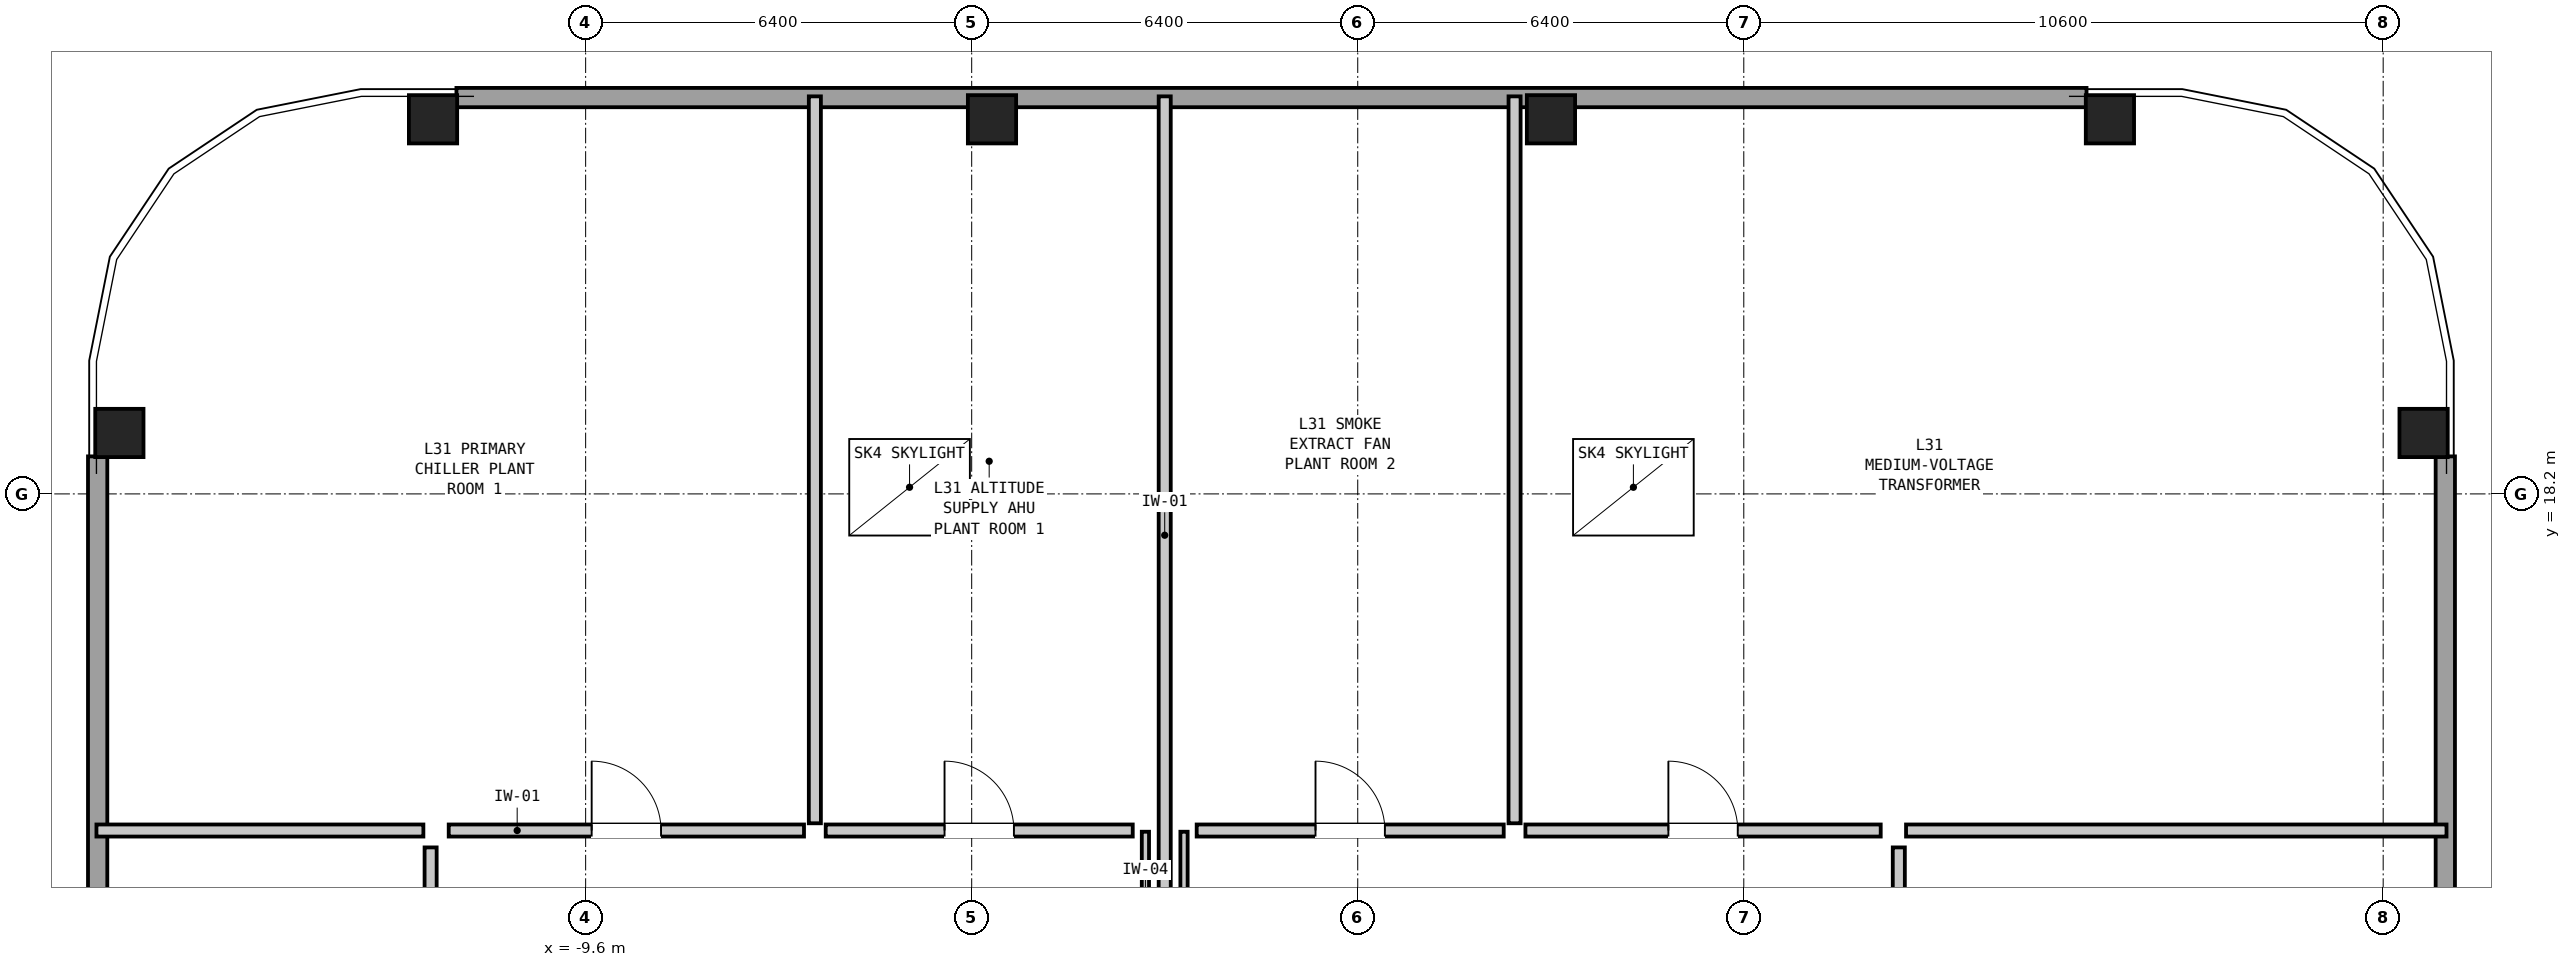
"""IFC4 building model, lengths in metres.
Left out: names, types, materials, properties, quantities, classifications, styles, units other than length and angle.
Written with IfcOpenShell. Run it as: python <this file> out.ifc"""

import sys

from ifc_helpers import new_model, si_unit, direction, frame, frame_2d, origin, origin_2d, place, context, subcontext, project, spatial, rectangle, hollow_rectangle, extrude, element, fill, save


model = new_model("IFC4")
c1 = context("Model", 3, precision=1e-05, world=origin(), true_north=direction((0.0, 1.0)))
c2 = subcontext(c1, "Body", "Model", "MODEL_VIEW")
j1 = project(units=[si_unit("LENGTHUNIT", "METRE"), si_unit("PLANEANGLEUNIT", "RADIAN")], contexts=[c1])
p1 = place(None, origin())
s1 = spatial("IfcSite", under=j1, at=p1, CompositionType="ELEMENT")
p2 = place(p1, origin())
s2 = spatial("IfcBuilding", under=s1, at=p2, CompositionType="ELEMENT")
p3 = place(p2, frame((0.0, 0.0, 108.45)))
s3 = spatial("IfcBuildingStorey", under=s2, at=p3, CompositionType="ELEMENT", Elevation=108.45)
for number, where, z_axis, x_axis in (
    (1, (20.87, 19.21, 0.0), (0.0, 0.0, 1.0), (0.0, 1.0, 0.0)),
    (2, (15.67, 24.41, 0.0), (0.0, 0.0, 1.0), (1.0, 0.0, 0.0)),
    (3, (6.403, 24.41, 0.0), (0.0, 0.0, 1.0), (1.0, 0.0, 0.0)),
    (4, (-2.863, 24.41, 0.0), (0.0, 0.0, 1.0), (1.0, 0.0, 0.0)),
    (5, (-12.13, 24.41, 0.0), (0.0, 0.0, 1.0), (1.0, 0.0, 0.0)),
    (6, (-17.33, 19.21, 0.0), (0.0, 0.0, 1.0), (0.0, 1.0, 0.0)),
):
    element("IfcColumn", number, at=place(p3, frame(where, z_axis=z_axis, x_axis=x_axis)), inside=s3, PredefinedType="COLUMN", context=c2, shape_type="SweptSolid", body=[
        extrude(hollow_rectangle(XDim=0.8, YDim=0.8, WallThickness=0.05, at=origin_2d()), origin(), (0.0, 0.0, 1.0), 4.35),
    ])
for number, where, z_axis, x_axis in (
    (7, (21.23, 18.822, 0.0), (0.0, 0.0, 1.0), (0.0, -1.0, 0.0)),
    (8, (-11.742, 24.77, 0.0), (0.0, 0.0, 1.0), (1.0, 0.0, 0.0)),
    (9, (-17.69, -8.202, 0.0), (0.0, 0.0, 1.0), (0.0, 1.0, 0.0)),
):
    element("IfcWall", number, at=place(p3, frame(where, z_axis=z_axis, x_axis=x_axis)), inside=s3, PredefinedType="SOLIDWALL", context=c2, shape_type="SweptSolid", body=[
        extrude(rectangle(XDim=27.024, YDim=0.32, at=frame_2d((13.512, 0.0))), origin(), (0.0, 0.0, 1.0), 2.31),
    ])
p4 = place(p3, frame((0.0, 10.24, 0.0), z_axis=(0.0, 0.0, 1.0), x_axis=(0.0, 1.0, 0.0)))
e10 = element("IfcWall", 10, at=p4, inside=s3, PredefinedType="PARTITIONING", context=c2, shape_type="SweptSolid", body=[
    extrude(rectangle(XDim=14.55, YDim=0.2, at=frame_2d((7.275, 0.0))), origin(), (0.0, 0.0, 1.0), 2.31),
])
for number, where, z_axis, x_axis in (
    (11, (-0.32, 10.24, 0.0), (0.0, 0.0, 1.0), (0.0, 1.0, 0.0)),
    (12, (0.32, 10.24, 0.0), (0.0, 0.0, 1.0), (0.0, 1.0, 0.0)),
):
    element("IfcWall", number, at=place(p3, frame(where, z_axis=z_axis, x_axis=x_axis)), inside=s3, PredefinedType="PARTITIONING", context=c2, shape_type="SweptSolid", body=[
        extrude(rectangle(XDim=2.36, YDim=0.12, at=frame_2d((1.18, 0.0))), origin(), (0.0, 0.0, 1.0), 2.31),
    ])
p5 = place(p3, frame((-11.87, 12.62, 0.0), z_axis=(0.0, 0.0, 1.0), x_axis=(1.0, 0.0, 0.0)))
e13 = element("IfcWall", 13, at=p5, inside=s3, PredefinedType="PARTITIONING", context=c2, shape_type="SweptSolid", body=[
    extrude(rectangle(XDim=5.89, YDim=0.2, at=frame_2d((2.945, 0.0))), origin(), (0.0, 0.0, 1.0), 4.13),
])
p6 = place(p5, frame((2.37, 0.0, 0.0)))
e14 = element("IfcOpeningElement", 14, at=p6, cuts=e13, PredefinedType="OPENING", context=c2, shape_type="SweptSolid", body=[
    extrude(rectangle(XDim=1.15, YDim=2.1, at=frame_2d((0.575, 1.05))), frame((0.0, 0.112, 0.0), z_axis=(0.0, -1.0, 0.0), x_axis=(1.0, 0.0, 0.0)), (0.0, 0.0, 1.0), 0.224),
])
p7 = place(p3, frame((-5.8, 12.74, 0.0), z_axis=(0.0, 0.0, 1.0), x_axis=(0.0, 1.0, 0.0)))
e15 = element("IfcWall", 15, at=p7, inside=s3, PredefinedType="PARTITIONING", context=c2, shape_type="SweptSolid", body=[
    extrude(rectangle(XDim=12.05, YDim=0.2, at=frame_2d((6.025, 0.0))), origin(), (0.0, 0.0, 1.0), 3.647),
])
p8 = place(p3, frame((-5.62, 12.62, 0.0), z_axis=(0.0, 0.0, 1.0), x_axis=(1.0, 0.0, 0.0)))
e16 = element("IfcWall", 16, at=p8, inside=s3, PredefinedType="PARTITIONING", context=c2, shape_type="SweptSolid", body=[
    extrude(rectangle(XDim=5.09, YDim=0.2, at=frame_2d((2.545, 0.0))), origin(), (0.0, 0.0, 1.0), 4.13),
])
p9 = place(p8, frame((1.97, 0.0, 0.0)))
e17 = element("IfcOpeningElement", 17, at=p9, cuts=e16, PredefinedType="OPENING", context=c2, shape_type="SweptSolid", body=[
    extrude(rectangle(XDim=1.15, YDim=2.1, at=frame_2d((0.575, 1.05))), frame((0.0, 0.112, 0.0), z_axis=(0.0, -1.0, 0.0), x_axis=(1.0, 0.0, 0.0)), (0.0, 0.0, 1.0), 0.224),
])
p10 = place(p3, frame((0.53, 12.62, 0.0), z_axis=(0.0, 0.0, 1.0), x_axis=(1.0, 0.0, 0.0)))
e18 = element("IfcWall", 18, at=p10, inside=s3, PredefinedType="PARTITIONING", context=c2, shape_type="SweptSolid", body=[
    extrude(rectangle(XDim=5.09, YDim=0.2, at=frame_2d((2.545, 0.0))), origin(), (0.0, 0.0, 1.0), 4.13),
])
p11 = place(p10, frame((1.97, 0.0, 0.0)))
e19 = element("IfcOpeningElement", 19, at=p11, cuts=e18, PredefinedType="OPENING", context=c2, shape_type="SweptSolid", body=[
    extrude(rectangle(XDim=1.15, YDim=2.1, at=frame_2d((0.575, 1.05))), frame((0.0, 0.112, 0.0), z_axis=(0.0, -1.0, 0.0), x_axis=(1.0, 0.0, 0.0)), (0.0, 0.0, 1.0), 0.224),
])
p12 = place(p3, frame((5.8, 12.74, 0.0), z_axis=(0.0, 0.0, 1.0), x_axis=(0.0, 1.0, 0.0)))
e20 = element("IfcWall", 20, at=p12, inside=s3, PredefinedType="PARTITIONING", context=c2, shape_type="SweptSolid", body=[
    extrude(rectangle(XDim=12.05, YDim=0.2, at=frame_2d((6.025, 0.0))), origin(), (0.0, 0.0, 1.0), 3.647),
])
p13 = place(p3, frame((5.98, 12.62, 0.0), z_axis=(0.0, 0.0, 1.0), x_axis=(1.0, 0.0, 0.0)))
e21 = element("IfcWall", 21, at=p13, inside=s3, PredefinedType="PARTITIONING", context=c2, shape_type="SweptSolid", body=[
    extrude(rectangle(XDim=5.89, YDim=0.2, at=frame_2d((2.945, 0.0))), origin(), (0.0, 0.0, 1.0), 4.13),
])
p14 = place(p13, frame((2.37, 0.0, 0.0)))
e22 = element("IfcOpeningElement", 22, at=p14, cuts=e21, PredefinedType="OPENING", context=c2, shape_type="SweptSolid", body=[
    extrude(rectangle(XDim=1.15, YDim=2.1, at=frame_2d((0.575, 1.05))), frame((0.0, 0.112, 0.0), z_axis=(0.0, -1.0, 0.0), x_axis=(1.0, 0.0, 0.0)), (0.0, 0.0, 1.0), 0.224),
])
p15 = place(p3, frame((-17.71, 12.62, 0.0), z_axis=(0.0, 0.0, 1.0), x_axis=(1.0, 0.0, 0.0)))
e23 = element("IfcWall", 23, at=p15, inside=s3, PredefinedType="PARTITIONING", context=c2, shape_type="SweptSolid", body=[
    extrude(rectangle(XDim=5.42, YDim=0.2, at=frame_2d((2.71, 0.0))), origin(), (0.0, 0.0, 1.0), 4.13),
])
p16 = place(p3, frame((12.29, 12.62, 0.0), z_axis=(0.0, 0.0, 1.0), x_axis=(1.0, 0.0, 0.0)))
e24 = element("IfcWall", 24, at=p16, inside=s3, PredefinedType="PARTITIONING", context=c2, shape_type="SweptSolid", body=[
    extrude(rectangle(XDim=8.96, YDim=0.2, at=frame_2d((4.48, 0.0))), origin(), (0.0, 0.0, 1.0), 4.13),
])
p17 = place(p3, frame((-12.17, 0.81, 0.0), z_axis=(0.0, 0.0, 1.0), x_axis=(0.0, 1.0, 0.0)))
e25 = element("IfcWall", 25, at=p17, inside=s3, PredefinedType="PARTITIONING", context=c2, shape_type="SweptSolid", body=[
    extrude(rectangle(XDim=11.53, YDim=0.2, at=frame_2d((5.765, 0.0))), origin(), (0.0, 0.0, 1.0), 4.13),
])
p18 = place(p17, frame((5.19, 0.0, 0.0)))
e26 = element("IfcOpeningElement", 26, at=p18, cuts=e25, PredefinedType="OPENING", context=c2, shape_type="SweptSolid", body=[
    extrude(rectangle(XDim=1.15, YDim=2.1, at=frame_2d((0.575, 1.05))), frame((0.0, 0.112, 0.0), z_axis=(0.0, -1.0, 0.0), x_axis=(1.0, 0.0, 0.0)), (0.0, 0.0, 1.0), 0.224),
])
p19 = place(p3, frame((12.17, 0.81, 0.0), z_axis=(0.0, 0.0, 1.0), x_axis=(0.0, 1.0, 0.0)))
e27 = element("IfcWall", 27, at=p19, inside=s3, PredefinedType="PARTITIONING", context=c2, shape_type="SweptSolid", body=[
    extrude(rectangle(XDim=11.53, YDim=0.2, at=frame_2d((5.765, 0.0))), origin(), (0.0, 0.0, 1.0), 2.11),
])
p20 = place(p19, frame((6.574, 0.0, 0.0)))
e28 = element("IfcOpeningElement", 28, at=p20, cuts=e27, PredefinedType="OPENING", context=c2, shape_type="SweptSolid", body=[
    extrude(rectangle(XDim=0.9, YDim=2.05, at=frame_2d((0.45, 1.025))), frame((0.0, 0.112, 0.0), z_axis=(0.0, -1.0, 0.0), x_axis=(1.0, 0.0, 0.0)), (0.0, 0.0, 1.0), 0.224),
])
p21 = place(p3, frame((0.0, 0.0, -0.38)))
p22 = place(p21, frame((-4.23, 18.31, 0.0), z_axis=(0.0, 0.0, 1.0), x_axis=(1.0, 0.0, 0.0)))
p23 = place(p22, frame((0.0, 0.0, 0.33)))
e29 = element("IfcWindow", 29, at=p23, inside=s3, PartitioningType="SINGLE_PANEL", PredefinedType="SKYLIGHT", context=c2, shape_type="SweptSolid", body=[
    extrude(rectangle(XDim=2.0, YDim=1.6, at=origin_2d()), origin(), (0.0, 0.0, 1.0), 0.05),
])
p24 = place(p21, frame((7.77, 18.31, 0.0), z_axis=(0.0, 0.0, 1.0), x_axis=(1.0, 0.0, 0.0)))
p25 = place(p24, frame((0.0, 0.0, 0.33)))
e30 = element("IfcWindow", 30, at=p25, inside=s3, PartitioningType="SINGLE_PANEL", PredefinedType="SKYLIGHT", context=c2, shape_type="SweptSolid", body=[
    extrude(rectangle(XDim=2.0, YDim=1.6, at=origin_2d()), origin(), (0.0, 0.0, 1.0), 0.05),
])
p26 = place(p6, origin())
e31 = element("IfcDoor", 31, at=p26, inside=s3, OperationType="SINGLE_SWING_LEFT", PredefinedType="DOOR", context=c2, shape_type="SweptSolid", body=[
    extrude(rectangle(XDim=1.15, YDim=2.1, at=frame_2d((0.575, 1.05))), frame((0.0, 0.025, 0.0), z_axis=(0.0, -1.0, 0.0), x_axis=(1.0, 0.0, 0.0)), (0.0, 0.0, 1.0), 0.05),
])
fill(e14, e31)
p27 = place(p9, origin())
e32 = element("IfcDoor", 32, at=p27, inside=s3, OperationType="SINGLE_SWING_LEFT", PredefinedType="DOOR", context=c2, shape_type="SweptSolid", body=[
    extrude(rectangle(XDim=1.15, YDim=2.1, at=frame_2d((0.575, 1.05))), frame((0.0, 0.025, 0.0), z_axis=(0.0, -1.0, 0.0), x_axis=(1.0, 0.0, 0.0)), (0.0, 0.0, 1.0), 0.05),
])
fill(e17, e32)
p28 = place(p11, origin())
e33 = element("IfcDoor", 33, at=p28, inside=s3, OperationType="SINGLE_SWING_LEFT", PredefinedType="DOOR", context=c2, shape_type="SweptSolid", body=[
    extrude(rectangle(XDim=1.15, YDim=2.1, at=frame_2d((0.575, 1.05))), frame((0.0, 0.025, 0.0), z_axis=(0.0, -1.0, 0.0), x_axis=(1.0, 0.0, 0.0)), (0.0, 0.0, 1.0), 0.05),
])
fill(e19, e33)
p29 = place(p14, origin())
e34 = element("IfcDoor", 34, at=p29, inside=s3, OperationType="SINGLE_SWING_LEFT", PredefinedType="DOOR", context=c2, shape_type="SweptSolid", body=[
    extrude(rectangle(XDim=1.15, YDim=2.1, at=frame_2d((0.575, 1.05))), frame((0.0, 0.025, 0.0), z_axis=(0.0, -1.0, 0.0), x_axis=(1.0, 0.0, 0.0)), (0.0, 0.0, 1.0), 0.05),
])
fill(e22, e34)
save(model, sys.argv[1])
